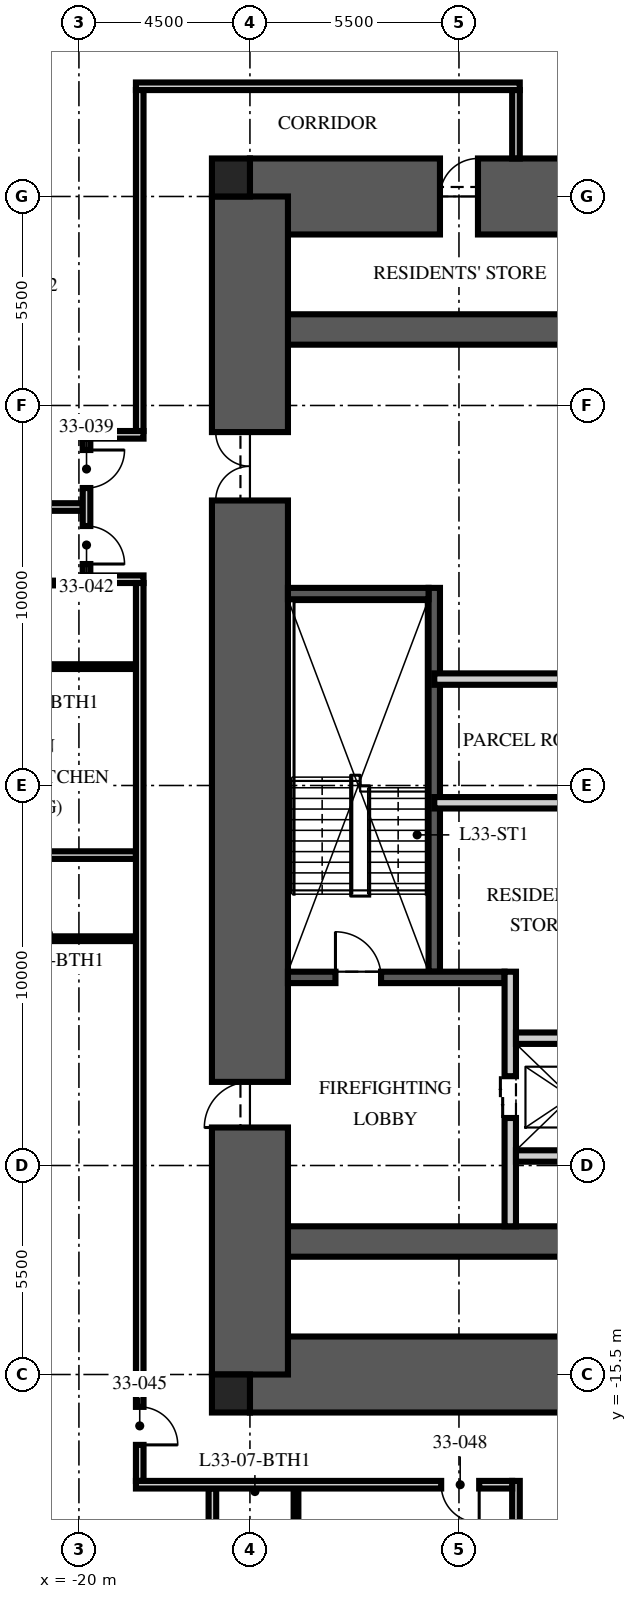
"""IFC4 building model, lengths in metres.
Left out: names, types, materials, properties, quantities, classifications, styles, units other than length and angle.
Written with IfcOpenShell. Run it as: python <this file> out.ifc"""

import sys

from ifc_helpers import new_model, si_unit, direction, frame, frame_2d, origin, origin_2d, place, context, subcontext, project, spatial, rectangle, extrude, element, fill, save


model = new_model("IFC4")
c1 = context("Model", 3, precision=1e-05, world=origin(), true_north=direction((0.0, 1.0)))
c2 = subcontext(c1, "Body", "Model", "MODEL_VIEW")
j1 = project(units=[si_unit("LENGTHUNIT", "METRE"), si_unit("PLANEANGLEUNIT", "RADIAN")], contexts=[c1])
p1 = place(None, origin())
s1 = spatial("IfcSite", under=j1, at=p1, CompositionType="ELEMENT")
p2 = place(p1, origin())
s2 = spatial("IfcBuilding", under=s1, at=p2, CompositionType="ELEMENT")
p3 = place(p2, frame((0.0, 0.0, 133.5)))
s3 = spatial("IfcBuildingStorey", under=s2, at=p3, CompositionType="ELEMENT", Elevation=133.5)
p4 = place(p3, frame((-15.5, 15.5, -0.25), z_axis=(0.0, 0.0, 1.0), x_axis=(1.0, 0.0, 0.0)))
e1 = element("IfcWall", 1, at=p4, inside=s3, PredefinedType="SHEAR", context=c2, shape_type="SweptSolid", body=[
    extrude(rectangle(XDim=31.0, YDim=2.0, at=frame_2d((15.5, 0.0))), origin(), (0.0, 0.0, 1.0), 3.75),
])
p5 = place(p4, frame((5.0, 0.0, 0.25)))
e2 = element("IfcOpeningElement", 2, at=p5, cuts=e1, PredefinedType="OPENING", context=c2, shape_type="SweptSolid", body=[
    extrude(rectangle(XDim=1.0, YDim=2.1, at=frame_2d((0.5, 1.05))), frame((0.0, 1.01, 0.0), z_axis=(0.0, -1.0, 0.0), x_axis=(1.0, 0.0, 0.0)), (0.0, 0.0, 1.0), 2.02),
])
p6 = place(p3, frame((-15.5, -15.5, -0.25), z_axis=(0.0, 0.0, 1.0), x_axis=(1.0, 0.0, 0.0)))
e3 = element("IfcWall", 3, at=p6, inside=s3, PredefinedType="SHEAR", context=c2, shape_type="SweptSolid", body=[
    extrude(rectangle(XDim=31.0, YDim=2.0, at=frame_2d((15.5, 0.0))), origin(), (0.0, 0.0, 1.0), 3.75),
])
p7 = place(p6, frame((10.4, 0.0, 0.25)))
e4 = element("IfcOpeningElement", 4, at=p7, cuts=e3, PredefinedType="OPENING", context=c2, shape_type="SweptSolid", body=[
    extrude(rectangle(XDim=1.1, YDim=2.1, at=frame_2d((0.55, 1.05))), frame((0.0, 1.01, 0.0), z_axis=(0.0, -1.0, 0.0), x_axis=(1.0, 0.0, 0.0)), (0.0, 0.0, 1.0), 2.02),
])
p8 = place(p6, frame((13.5, 0.0, 0.25)))
e5 = element("IfcOpeningElement", 5, at=p8, cuts=e3, PredefinedType="OPENING", context=c2, shape_type="SweptSolid", body=[
    extrude(rectangle(XDim=1.1, YDim=2.1, at=frame_2d((0.55, 1.05))), frame((0.0, 1.01, 0.0), z_axis=(0.0, -1.0, 0.0), x_axis=(1.0, 0.0, 0.0)), (0.0, 0.0, 1.0), 2.02),
])
p9 = place(p6, frame((16.6, 0.0, 0.25)))
e6 = element("IfcOpeningElement", 6, at=p9, cuts=e3, PredefinedType="OPENING", context=c2, shape_type="SweptSolid", body=[
    extrude(rectangle(XDim=1.1, YDim=2.1, at=frame_2d((0.55, 1.05))), frame((0.0, 1.01, 0.0), z_axis=(0.0, -1.0, 0.0), x_axis=(1.0, 0.0, 0.0)), (0.0, 0.0, 1.0), 2.02),
])
for number, where, z_axis, x_axis in (
    (7, (-15.5, 12.0, -0.25), (0.0, 0.0, 1.0), (1.0, 0.0, 0.0)),
    (8, (-15.5, -12.0, -0.25), (0.0, 0.0, 1.0), (1.0, 0.0, 0.0)),
):
    element("IfcWall", number, at=place(p3, frame(where, z_axis=z_axis, x_axis=x_axis)), inside=s3, PredefinedType="SHEAR", context=c2, shape_type="SweptSolid", body=[
        extrude(rectangle(XDim=31.0, YDim=0.8, at=frame_2d((15.5, 0.0))), origin(), (0.0, 0.0, 1.0), 3.75),
    ])
p10 = place(p3, frame((-15.5, -15.5, -0.25), z_axis=(0.0, 0.0, 1.0), x_axis=(0.0, 1.0, 0.0)))
e9 = element("IfcWall", 9, at=p10, inside=s3, PredefinedType="SHEAR", context=c2, shape_type="SweptSolid", body=[
    extrude(rectangle(XDim=31.0, YDim=2.0, at=frame_2d((15.5, 0.0))), origin(), (0.0, 0.0, 1.0), 3.75),
])
p11 = place(p10, frame((6.5, 0.0, 0.25)))
e10 = element("IfcOpeningElement", 10, at=p11, cuts=e9, PredefinedType="OPENING", context=c2, shape_type="SweptSolid", body=[
    extrude(rectangle(XDim=1.2, YDim=2.1, at=frame_2d((0.6, 1.05))), frame((0.0, 1.01, 0.0), z_axis=(0.0, -1.0, 0.0), x_axis=(1.0, 0.0, 0.0)), (0.0, 0.0, 1.0), 2.02),
])
p12 = place(p10, frame((23.0, 0.0, 0.25)))
e11 = element("IfcOpeningElement", 11, at=p12, cuts=e9, PredefinedType="OPENING", context=c2, shape_type="SweptSolid", body=[
    extrude(rectangle(XDim=1.8, YDim=2.1, at=frame_2d((0.9, 1.05))), frame((0.0, 1.01, 0.0), z_axis=(0.0, -1.0, 0.0), x_axis=(1.0, 0.0, 0.0)), (0.0, 0.0, 1.0), 2.02),
])
for number, where, z_axis, x_axis in (
    (12, (-16.0, 16.0, -0.25), (0.0, 0.0, 1.0), (1.0, 0.0, 0.0)),
    (13, (-16.0, -16.0, -0.25), (0.0, 0.0, 1.0), (1.0, 0.0, 0.0)),
):
    element("IfcColumn", number, at=place(p3, frame(where, z_axis=z_axis, x_axis=x_axis)), inside=s3, PredefinedType="COLUMN", context=c2, shape_type="SweptSolid", body=[
        extrude(rectangle(XDim=1.0, YDim=1.0, at=origin_2d()), origin(), (0.0, 0.0, 1.0), 3.75),
    ])
p13 = place(p3, frame((-10.65, -4.9, 0.0), z_axis=(0.0, 0.0, 1.0), x_axis=(0.0, 1.0, 0.0)))
e14 = element("IfcWall", 14, at=p13, inside=s3, PredefinedType="SOLIDWALL", context=c2, shape_type="SweptSolid", body=[
    extrude(rectangle(XDim=10.1, YDim=0.3, at=frame_2d((5.05, 0.0))), origin(), (0.0, 0.0, 1.0), 3.5),
])
p14 = place(p3, frame((-14.5, -5.05, 0.0), z_axis=(0.0, 0.0, 1.0), x_axis=(1.0, 0.0, 0.0)))
e15 = element("IfcWall", 15, at=p14, inside=s3, PredefinedType="SOLIDWALL", context=c2, shape_type="SweptSolid", body=[
    extrude(rectangle(XDim=5.7, YDim=0.3, at=frame_2d((2.85, 0.0))), origin(), (0.0, 0.0, 1.0), 3.5),
])
p15 = place(p14, frame((1.25, 0.0, 0.0)))
e16 = element("IfcOpeningElement", 16, at=p15, cuts=e15, PredefinedType="OPENING", context=c2, shape_type="SweptSolid", body=[
    extrude(rectangle(XDim=1.2, YDim=2.1, at=frame_2d((0.6, 1.05))), frame((0.0, 0.16, 0.0), z_axis=(0.0, -1.0, 0.0), x_axis=(1.0, 0.0, 0.0)), (0.0, 0.0, 1.0), 0.32),
])
p16 = place(p3, frame((-14.5, 5.05, 0.0), z_axis=(0.0, 0.0, 1.0), x_axis=(1.0, 0.0, 0.0)))
e17 = element("IfcWall", 17, at=p16, inside=s3, PredefinedType="SOLIDWALL", context=c2, shape_type="SweptSolid", body=[
    extrude(rectangle(XDim=3.7, YDim=0.3, at=frame_2d((1.85, 0.0))), origin(), (0.0, 0.0, 1.0), 3.5),
])
p17 = place(p3, frame((-8.65, -11.6, 0.0), z_axis=(0.0, 0.0, 1.0), x_axis=(0.0, 1.0, 0.0)))
e18 = element("IfcWall", 18, at=p17, inside=s3, PredefinedType="PARTITIONING", context=c2, shape_type="SweptSolid", body=[
    extrude(rectangle(XDim=6.7, YDim=0.3, at=frame_2d((3.35, 0.0))), origin(), (0.0, 0.0, 1.0), 3.5),
])
p18 = place(p17, frame((2.85, 0.0, 0.0)))
e19 = element("IfcOpeningElement", 19, at=p18, cuts=e18, PredefinedType="OPENING", context=c2, shape_type="SweptSolid", body=[
    extrude(rectangle(XDim=1.1, YDim=2.1, at=frame_2d((0.55, 1.05))), frame((0.0, 0.16, 0.0), z_axis=(0.0, -1.0, 0.0), x_axis=(1.0, 0.0, 0.0)), (0.0, 0.0, 1.0), 0.32),
])
p19 = place(p3, frame((-8.5, -6.65, 0.0), z_axis=(0.0, 0.0, 1.0), x_axis=(1.0, 0.0, 0.0)))
e20 = element("IfcWall", 20, at=p19, inside=s3, PredefinedType="PARTITIONING", context=c2, shape_type="SweptSolid", body=[
    extrude(rectangle(XDim=17.0, YDim=0.3, at=frame_2d((8.5, 0.0))), origin(), (0.0, 0.0, 1.0), 3.5),
])
p20 = place(p19, frame((7.8, 0.0, 0.0)))
e21 = element("IfcOpeningElement", 21, at=p20, cuts=e20, PredefinedType="OPENING", context=c2, shape_type="SweptSolid", body=[
    extrude(rectangle(XDim=1.3, YDim=2.4, at=frame_2d((0.65, 1.2))), frame((0.0, 0.16, 0.0), z_axis=(0.0, -1.0, 0.0), x_axis=(1.0, 0.0, 0.0)), (0.0, 0.0, 1.0), 0.32),
])
p21 = place(p19, frame((5.65, 0.0, 0.0)))
e22 = element("IfcOpeningElement", 22, at=p21, cuts=e20, PredefinedType="OPENING", context=c2, shape_type="SweptSolid", body=[
    extrude(rectangle(XDim=0.9, YDim=2.1, at=frame_2d((0.45, 1.05))), frame((0.0, 0.16, 0.0), z_axis=(0.0, -1.0, 0.0), x_axis=(1.0, 0.0, 0.0)), (0.0, 0.0, 1.0), 0.32),
])
p22 = place(p19, frame((10.4, 0.0, 0.0)))
e23 = element("IfcOpeningElement", 23, at=p22, cuts=e20, PredefinedType="OPENING", context=c2, shape_type="SweptSolid", body=[
    extrude(rectangle(XDim=0.9, YDim=2.1, at=frame_2d((0.45, 1.05))), frame((0.0, 0.16, 0.0), z_axis=(0.0, -1.0, 0.0), x_axis=(1.0, 0.0, 0.0)), (0.0, 0.0, 1.0), 0.32),
])
p23 = place(p3, frame((-8.5, -9.75, 0.0), z_axis=(0.0, 0.0, 1.0), x_axis=(1.0, 0.0, 0.0)))
e24 = element("IfcWall", 24, at=p23, inside=s3, PredefinedType="PARTITIONING", context=c2, shape_type="SweptSolid", body=[
    extrude(rectangle(XDim=2.9, YDim=0.3, at=frame_2d((1.45, 0.0))), origin(), (0.0, 0.0, 1.0), 3.5),
])
p24 = place(p3, frame((-10.65, 2.8, 0.0), z_axis=(0.0, 0.0, 1.0), x_axis=(1.0, 0.0, 0.0)))
e25 = element("IfcWall", 25, at=p24, inside=s3, PredefinedType="PARTITIONING", context=c2, shape_type="SweptSolid", body=[
    extrude(rectangle(XDim=21.3, YDim=0.3, at=frame_2d((10.65, 0.0))), origin(), (0.0, 0.0, 1.0), 3.5),
])
p25 = place(p24, frame((10.05, 0.0, 0.0)))
e26 = element("IfcOpeningElement", 26, at=p25, cuts=e25, PredefinedType="OPENING", context=c2, shape_type="SweptSolid", body=[
    extrude(rectangle(XDim=1.2, YDim=2.1, at=frame_2d((0.6, 1.05))), frame((0.0, 0.16, 0.0), z_axis=(0.0, -1.0, 0.0), x_axis=(1.0, 0.0, 0.0)), (0.0, 0.0, 1.0), 0.32),
])
p26 = place(p24, frame((19.121, 0.0, 0.0)))
e27 = element("IfcOpeningElement", 27, at=p26, cuts=e25, PredefinedType="OPENING", context=c2, shape_type="SweptSolid", body=[
    extrude(rectangle(XDim=0.9, YDim=2.1, at=frame_2d((0.45, 1.05))), frame((0.0, 0.16, 0.0), z_axis=(0.0, -1.0, 0.0), x_axis=(1.0, 0.0, 0.0)), (0.0, 0.0, 1.0), 0.32),
])
p27 = place(p3, frame((-10.65, -0.455, 0.0), z_axis=(0.0, 0.0, 1.0), x_axis=(1.0, 0.0, 0.0)))
e28 = element("IfcWall", 28, at=p27, inside=s3, PredefinedType="PARTITIONING", context=c2, shape_type="SweptSolid", body=[
    extrude(rectangle(XDim=5.55, YDim=0.3, at=frame_2d((2.775, 0.0))), origin(), (0.0, 0.0, 1.0), 3.5),
])
p28 = place(p3, frame((-18.5, 18.4, 0.0), z_axis=(0.0, 0.0, 1.0), x_axis=(1.0, 0.0, 0.0)))
e29 = element("IfcWall", 29, at=p28, inside=s3, PredefinedType="PARTITIONING", context=c2, shape_type="SweptSolid", body=[
    extrude(rectangle(XDim=10.1, YDim=0.2, at=frame_2d((5.05, 0.0))), origin(), (0.0, 0.0, 1.0), 2.3),
])
p29 = place(p3, frame((-8.5, 18.3, 0.0), z_axis=(0.0, 0.0, 1.0), x_axis=(0.0, -1.0, 0.0)))
e30 = element("IfcWall", 30, at=p29, inside=s3, PredefinedType="PARTITIONING", context=c2, shape_type="SweptSolid", body=[
    extrude(rectangle(XDim=1.8, YDim=0.2, at=frame_2d((0.9, 0.0))), origin(), (0.0, 0.0, 1.0), 3.5),
])
p30 = place(p3, frame((-19.9, 7.328, 0.0), z_axis=(0.0, 0.0, 1.0), x_axis=(-1.0, 0.0, 0.0)))
e31 = element("IfcWall", 31, at=p30, inside=s3, PredefinedType="PARTITIONING", context=c2, shape_type="SweptSolid", body=[
    extrude(rectangle(XDim=9.0, YDim=0.2, at=frame_2d((4.5, 0.0))), origin(), (0.0, 0.0, 1.0), 2.81),
])
for number, where, z_axis, x_axis in (
    (32, (-18.5, -1.832, 0.0), (0.0, 0.0, 1.0), (-1.0, 0.0, 0.0)),
    (33, (-16.488, -18.5, 0.0), (0.0, 0.0, 1.0), (0.0, -1.0, 0.0)),
):
    element("IfcWall", number, at=place(p3, frame(where, z_axis=z_axis, x_axis=x_axis)), inside=s3, PredefinedType="PARTITIONING", context=c2, shape_type="SweptSolid", body=[
        extrude(rectangle(XDim=10.4, YDim=0.2, at=frame_2d((5.2, 0.0))), origin(), (0.0, 0.0, 1.0), 2.81),
    ])
p31 = place(p3, frame((-19.97, 5.328, 0.0), z_axis=(0.0, 0.0, 1.0), x_axis=(-1.0, 0.0, 0.0)))
e34 = element("IfcWall", 34, at=p31, inside=s3, PredefinedType="PARTITIONING", context=c2, shape_type="SweptSolid", body=[
    extrude(rectangle(XDim=2.81, YDim=0.125, at=frame_2d((1.405, 0.0))), origin(), (0.0, 0.0, 1.0), 3.5),
])
for number, where, z_axis, x_axis in (
    (35, (-18.5, 3.128, 0.0), (0.0, 0.0, 1.0), (-1.0, 0.0, 0.0)),
    (36, (-18.5, -4.032, 0.0), (0.0, 0.0, 1.0), (-1.0, 0.0, 0.0)),
    (37, (-14.288, -18.5, 0.0), (0.0, 0.0, 1.0), (0.0, -1.0, 0.0)),
):
    element("IfcWall", number, at=place(p3, frame(where, z_axis=z_axis, x_axis=x_axis)), inside=s3, PredefinedType="PARTITIONING", context=c2, shape_type="SweptSolid", body=[
        extrude(rectangle(XDim=4.28, YDim=0.125, at=frame_2d((2.14, 0.0))), origin(), (0.0, 0.0, 1.0), 3.5),
    ])
p32 = place(p3, frame((-18.4, 18.3, 0.0), z_axis=(0.0, 0.0, 1.0), x_axis=(0.0, -1.0, 0.0)))
e38 = element("IfcWall", 38, at=p32, inside=s3, PredefinedType="PARTITIONING", context=c2, shape_type="SweptSolid", body=[
    extrude(rectangle(XDim=8.972, YDim=0.2, at=frame_2d((4.486, 0.0))), origin(), (0.0, 0.0, 1.0), 2.3),
])
p33 = place(p3, frame((-18.3, 9.228, 0.0), z_axis=(0.0, 0.0, 1.0), x_axis=(-1.0, 0.0, 0.0)))
e39 = element("IfcWall", 39, at=p33, inside=s3, PredefinedType="PARTITIONING", context=c2, shape_type="SweptSolid", body=[
    extrude(rectangle(XDim=1.6, YDim=0.2, at=frame_2d((0.8, 0.0))), origin(), (0.0, 0.0, 1.0), 2.7),
])
p34 = place(p3, frame((-18.3, 5.428, 0.0), z_axis=(0.0, 0.0, 1.0), x_axis=(-1.0, 0.0, 0.0)))
e40 = element("IfcWall", 40, at=p34, inside=s3, PredefinedType="PARTITIONING", context=c2, shape_type="SweptSolid", body=[
    extrude(rectangle(XDim=1.6, YDim=0.2, at=frame_2d((0.8, 0.0))), origin(), (0.0, 0.0, 1.0), 3.5),
])
p35 = place(p3, frame((-19.8, 9.128, 0.0), z_axis=(0.0, 0.0, 1.0), x_axis=(0.0, -1.0, 0.0)))
e41 = element("IfcWall", 41, at=p35, inside=s3, PredefinedType="PARTITIONING", context=c2, shape_type="SweptSolid", body=[
    extrude(rectangle(XDim=3.6, YDim=0.2, at=frame_2d((1.8, 0.0))), origin(), (0.0, 0.0, 1.0), 2.7),
])
p36 = place(p35, frame((0.3, 0.0, 0.0)))
e42 = element("IfcOpeningElement", 42, at=p36, cuts=e41, PredefinedType="OPENING", context=c2, shape_type="SweptSolid", body=[
    extrude(rectangle(XDim=1.0, YDim=2.2, at=frame_2d((0.5, 1.1))), frame((0.0, 0.11, 0.0), z_axis=(0.0, -1.0, 0.0), x_axis=(1.0, 0.0, 0.0)), (0.0, 0.0, 1.0), 0.22),
])
p37 = place(p35, frame((2.3, 0.0, 0.0)))
e43 = element("IfcOpeningElement", 43, at=p37, cuts=e41, PredefinedType="OPENING", context=c2, shape_type="SweptSolid", body=[
    extrude(rectangle(XDim=1.0, YDim=2.2, at=frame_2d((0.5, 1.1))), frame((0.0, 0.11, 0.0), z_axis=(0.0, -1.0, 0.0), x_axis=(1.0, 0.0, 0.0)), (0.0, 0.0, 1.0), 0.22),
])
p38 = place(p3, frame((-18.4, 5.328, 0.0), z_axis=(0.0, 0.0, 1.0), x_axis=(0.0, -1.0, 0.0)))
e44 = element("IfcWall", 44, at=p38, inside=s3, PredefinedType="PARTITIONING", context=c2, shape_type="SweptSolid", body=[
    extrude(rectangle(XDim=23.628, YDim=0.2, at=frame_2d((11.814, 0.0))), origin(), (0.0, 0.0, 1.0), 2.3),
])
p39 = place(p38, frame((21.68, 0.0, 0.0)))
e45 = element("IfcOpeningElement", 45, at=p39, cuts=e44, PredefinedType="OPENING", context=c2, shape_type="SweptSolid", body=[
    extrude(rectangle(XDim=1.0, YDim=2.2, at=frame_2d((0.5, 1.1))), frame((0.0, 0.11, 0.0), z_axis=(0.0, -1.0, 0.0), x_axis=(1.0, 0.0, 0.0)), (0.0, 0.0, 1.0), 0.22),
])
p40 = place(p3, frame((-8.5, -18.3, 0.0), z_axis=(0.0, 0.0, 1.0), x_axis=(0.0, -1.0, 0.0)))
e46 = element("IfcWall", 46, at=p40, inside=s3, PredefinedType="PARTITIONING", context=c2, shape_type="SweptSolid", body=[
    extrude(rectangle(XDim=3.0, YDim=0.2, at=frame_2d((1.5, 0.0))), origin(), (0.0, 0.0, 1.0), 3.5),
])
p41 = place(p3, frame((-8.6, -18.4, 0.0), z_axis=(0.0, 0.0, 1.0), x_axis=(-1.0, 0.0, 0.0)))
e47 = element("IfcWall", 47, at=p41, inside=s3, PredefinedType="PARTITIONING", context=c2, shape_type="SweptSolid", body=[
    extrude(rectangle(XDim=9.9, YDim=0.2, at=frame_2d((4.95, 0.0))), origin(), (0.0, 0.0, 1.0), 2.3),
])
p42 = place(p41, frame((0.868, 0.0, 0.0)))
e48 = element("IfcOpeningElement", 48, at=p42, cuts=e47, PredefinedType="OPENING", context=c2, shape_type="SweptSolid", body=[
    extrude(rectangle(XDim=1.0, YDim=2.2, at=frame_2d((0.5, 1.1))), frame((0.0, 0.11, 0.0), z_axis=(0.0, -1.0, 0.0), x_axis=(1.0, 0.0, 0.0)), (0.0, 0.0, 1.0), 0.22),
])
p43 = place(p15, origin())
e49 = element("IfcDoor", 49, at=p43, inside=s3, OperationType="SINGLE_SWING_LEFT", PredefinedType="DOOR", context=c2, shape_type="SweptSolid", body=[
    extrude(rectangle(XDim=1.2, YDim=2.1, at=frame_2d((0.6, 1.05))), frame((0.0, 0.025, 0.0), z_axis=(0.0, -1.0, 0.0), x_axis=(1.0, 0.0, 0.0)), (0.0, 0.0, 1.0), 0.05),
])
fill(e16, e49)
p44 = place(p11, origin())
e50 = element("IfcDoor", 50, at=p44, inside=s3, OperationType="SINGLE_SWING_LEFT", PredefinedType="DOOR", context=c2, shape_type="SweptSolid", body=[
    extrude(rectangle(XDim=1.2, YDim=2.1, at=frame_2d((0.6, 1.05))), frame((0.0, 0.025, 0.0), z_axis=(0.0, -1.0, 0.0), x_axis=(1.0, 0.0, 0.0)), (0.0, 0.0, 1.0), 0.05),
])
fill(e10, e50)
p45 = place(p12, origin())
e51 = element("IfcDoor", 51, at=p45, inside=s3, OperationType="DOUBLE_DOOR_SINGLE_SWING", PredefinedType="DOOR", context=c2, shape_type="SweptSolid", body=[
    extrude(rectangle(XDim=1.8, YDim=2.1, at=frame_2d((0.9, 1.05))), frame((0.0, 0.025, 0.0), z_axis=(0.0, -1.0, 0.0), x_axis=(1.0, 0.0, 0.0)), (0.0, 0.0, 1.0), 0.05),
])
fill(e11, e51)
p46 = place(p18, origin())
e52 = element("IfcDoor", 52, at=p46, inside=s3, OperationType="DOUBLE_DOOR_SLIDING", PredefinedType="DOOR", context=c2, shape_type="SweptSolid", body=[
    extrude(rectangle(XDim=1.1, YDim=2.1, at=frame_2d((0.55, 1.05))), frame((0.0, 0.025, 0.0), z_axis=(0.0, -1.0, 0.0), x_axis=(1.0, 0.0, 0.0)), (0.0, 0.0, 1.0), 0.05),
])
fill(e19, e52)
p47 = place(p5, origin())
e53 = element("IfcDoor", 53, at=p47, inside=s3, OperationType="SINGLE_SWING_RIGHT", PredefinedType="DOOR", context=c2, shape_type="SweptSolid", body=[
    extrude(rectangle(XDim=1.0, YDim=2.1, at=frame_2d((0.5, 1.05))), frame((0.0, 0.025, 0.0), z_axis=(0.0, -1.0, 0.0), x_axis=(1.0, 0.0, 0.0)), (0.0, 0.0, 1.0), 0.05),
])
fill(e2, e53)
p48 = place(p36, origin())
e54 = element("IfcDoor", 54, at=p48, inside=s3, OperationType="SINGLE_SWING_LEFT", PredefinedType="DOOR", context=c2, shape_type="SweptSolid", body=[
    extrude(rectangle(XDim=1.0, YDim=2.2, at=frame_2d((0.5, 1.1))), frame((0.0, 0.025, 0.0), z_axis=(0.0, -1.0, 0.0), x_axis=(1.0, 0.0, 0.0)), (0.0, 0.0, 1.0), 0.05),
])
fill(e42, e54)
p49 = place(p37, origin())
e55 = element("IfcDoor", 55, at=p49, inside=s3, OperationType="SINGLE_SWING_RIGHT", PredefinedType="DOOR", context=c2, shape_type="SweptSolid", body=[
    extrude(rectangle(XDim=1.0, YDim=2.2, at=frame_2d((0.5, 1.1))), frame((0.0, 0.025, 0.0), z_axis=(0.0, -1.0, 0.0), x_axis=(1.0, 0.0, 0.0)), (0.0, 0.0, 1.0), 0.05),
])
fill(e43, e55)
p50 = place(p39, origin())
e56 = element("IfcDoor", 56, at=p50, inside=s3, OperationType="SINGLE_SWING_RIGHT", PredefinedType="DOOR", context=c2, shape_type="SweptSolid", body=[
    extrude(rectangle(XDim=1.0, YDim=2.2, at=frame_2d((0.5, 1.1))), frame((0.0, 0.025, 0.0), z_axis=(0.0, -1.0, 0.0), x_axis=(1.0, 0.0, 0.0)), (0.0, 0.0, 1.0), 0.05),
])
fill(e45, e56)
p51 = place(p42, origin())
e57 = element("IfcDoor", 57, at=p51, inside=s3, OperationType="SINGLE_SWING_LEFT", PredefinedType="DOOR", context=c2, shape_type="SweptSolid", body=[
    extrude(rectangle(XDim=1.0, YDim=2.2, at=frame_2d((0.5, 1.1))), frame((0.0, 0.025, 0.0), z_axis=(0.0, -1.0, 0.0), x_axis=(1.0, 0.0, 0.0)), (0.0, 0.0, 1.0), 0.05),
])
fill(e48, e57)
save(model, sys.argv[1])
